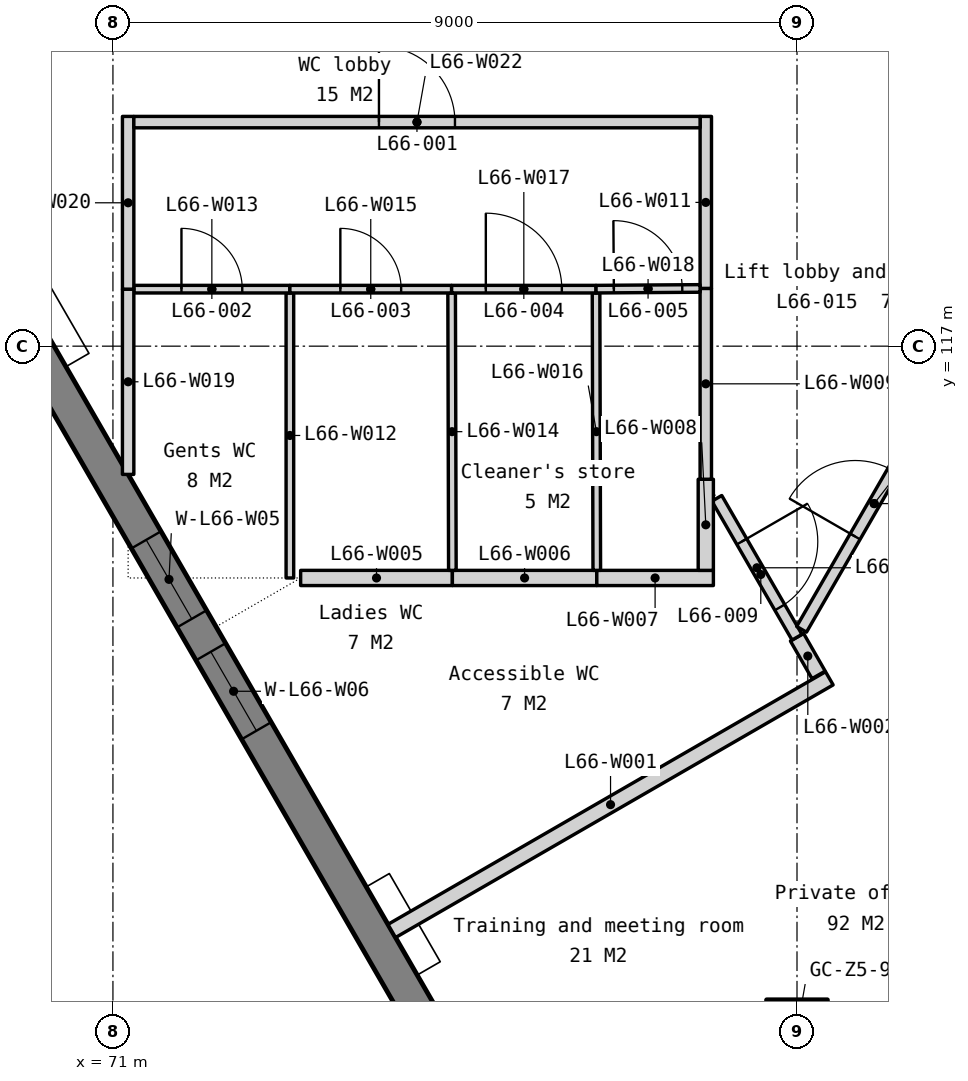
"""IFC4 building model, lengths in metres.
Left out: names, types, materials, properties, quantities, classifications, styles, units other than length and angle.
Written with IfcOpenShell. Run it as: python <this file> out.ifc"""

import sys

from ifc_helpers import new_model, si_unit, direction, frame, frame_2d, origin, origin_2d, place, context, subcontext, project, spatial, polyline, rectangle, outline, extrude, element, fill, save


model = new_model("IFC4")
c1 = context("Model", 3, precision=1e-05, world=origin(), true_north=direction((0.0, 1.0)))
c2 = subcontext(c1, "Body", "Model", "MODEL_VIEW")
j1 = project(units=[si_unit("LENGTHUNIT", "METRE"), si_unit("PLANEANGLEUNIT", "RADIAN")], contexts=[c1])
p1 = place(None, origin())
s1 = spatial("IfcSite", under=j1, at=p1, CompositionType="ELEMENT")
p2 = place(p1, origin())
s2 = spatial("IfcBuilding", under=s1, at=p2, CompositionType="ELEMENT")
p3 = place(p2, frame((0.0, 0.0, 269.9)))
s3 = spatial("IfcBuildingStorey", under=s2, at=p3, CompositionType="ELEMENT", Elevation=269.9)
p4 = place(p3, frame((80.0, 108.0, 0.0), z_axis=(0.0, 0.0, 1.0), x_axis=(1.0, 0.0, 0.0)))
e1 = element("IfcColumn", 1, at=p4, inside=s3, PredefinedType="COLUMN", context=c2, shape_type="SweptSolid", body=[
    extrude(rectangle(XDim=0.8, YDim=0.8, at=origin_2d()), origin(), (0.0, 0.0, 1.0), 3.9),
])
p5 = place(p3, frame((60.609, 133.207, -0.15), z_axis=(0.0, 0.0, 1.0), x_axis=(0.500002536638, -0.866023939251, 0.0)))
e2 = element("IfcWall", 2, at=p5, inside=s3, PredefinedType="SOLIDWALL", context=c2, shape_type="SweptSolid", body=[
    extrude(outline(polyline([(36.972, 0.0), (36.972, 3.9), (0.0, 3.9), (0.0, 0.0), (36.972, 0.0)])), frame((0.0, 0.225, 0.0), z_axis=(0.0, -1.0, 0.0), x_axis=(1.0, 0.0, 0.0)), (0.0, 0.0, 1.0), 0.45),
])
p6 = place(p5, frame((3.172, 0.0, 0.95)))
e3 = element("IfcOpeningElement", 3, at=p6, cuts=e2, PredefinedType="OPENING", context=c2, shape_type="SweptSolid", body=[
    extrude(rectangle(XDim=1.2, YDim=2.2, at=frame_2d((0.6, 1.1))), frame((0.0, 0.235, 0.0), z_axis=(0.0, -1.0, 0.0), x_axis=(1.0, 0.0, 0.0)), (0.0, 0.0, 1.0), 0.47),
])
p7 = place(p5, frame((4.872, 0.0, 0.95)))
e4 = element("IfcOpeningElement", 4, at=p7, cuts=e2, PredefinedType="OPENING", context=c2, shape_type="SweptSolid", body=[
    extrude(rectangle(XDim=1.2, YDim=2.2, at=frame_2d((0.6, 1.1))), frame((0.0, 0.235, 0.0), z_axis=(0.0, -1.0, 0.0), x_axis=(1.0, 0.0, 0.0)), (0.0, 0.0, 1.0), 0.47),
])
p8 = place(p5, frame((12.415, 0.0, 0.95)))
e5 = element("IfcOpeningElement", 5, at=p8, cuts=e2, PredefinedType="OPENING", context=c2, shape_type="SweptSolid", body=[
    extrude(rectangle(XDim=1.2, YDim=2.2, at=frame_2d((0.6, 1.1))), frame((0.0, 0.235, 0.0), z_axis=(0.0, -1.0, 0.0), x_axis=(1.0, 0.0, 0.0)), (0.0, 0.0, 1.0), 0.47),
])
p9 = place(p5, frame((14.115, 0.0, 0.95)))
e6 = element("IfcOpeningElement", 6, at=p9, cuts=e2, PredefinedType="OPENING", context=c2, shape_type="SweptSolid", body=[
    extrude(rectangle(XDim=1.2, YDim=2.2, at=frame_2d((0.6, 1.1))), frame((0.0, 0.235, 0.0), z_axis=(0.0, -1.0, 0.0), x_axis=(1.0, 0.0, 0.0)), (0.0, 0.0, 1.0), 0.47),
])
p10 = place(p5, frame((21.658, 0.0, 0.95)))
e7 = element("IfcOpeningElement", 7, at=p10, cuts=e2, PredefinedType="OPENING", context=c2, shape_type="SweptSolid", body=[
    extrude(rectangle(XDim=1.2, YDim=2.2, at=frame_2d((0.6, 1.1))), frame((0.0, 0.235, 0.0), z_axis=(0.0, -1.0, 0.0), x_axis=(1.0, 0.0, 0.0)), (0.0, 0.0, 1.0), 0.47),
])
p11 = place(p5, frame((23.358, 0.0, 0.95)))
e8 = element("IfcOpeningElement", 8, at=p11, cuts=e2, PredefinedType="OPENING", context=c2, shape_type="SweptSolid", body=[
    extrude(rectangle(XDim=1.2, YDim=2.2, at=frame_2d((0.6, 1.1))), frame((0.0, 0.235, 0.0), z_axis=(0.0, -1.0, 0.0), x_axis=(1.0, 0.0, 0.0)), (0.0, 0.0, 1.0), 0.47),
])
p12 = place(p5, frame((30.901, 0.0, 0.95)))
e9 = element("IfcOpeningElement", 9, at=p12, cuts=e2, PredefinedType="OPENING", context=c2, shape_type="SweptSolid", body=[
    extrude(rectangle(XDim=1.2, YDim=2.2, at=frame_2d((0.6, 1.1))), frame((0.0, 0.235, 0.0), z_axis=(0.0, -1.0, 0.0), x_axis=(1.0, 0.0, 0.0)), (0.0, 0.0, 1.0), 0.47),
])
p13 = place(p5, frame((32.601, 0.0, 0.95)))
e10 = element("IfcOpeningElement", 10, at=p13, cuts=e2, PredefinedType="OPENING", context=c2, shape_type="SweptSolid", body=[
    extrude(rectangle(XDim=1.2, YDim=2.2, at=frame_2d((0.6, 1.1))), frame((0.0, 0.235, 0.0), z_axis=(0.0, -1.0, 0.0), x_axis=(1.0, 0.0, 0.0)), (0.0, 0.0, 1.0), 0.47),
])
p14 = place(p3, frame((80.905, 101.188, -0.15), z_axis=(0.0, 0.0, 1.0), x_axis=(0.500002536638, 0.866023939251, 0.0)))
e11 = element("IfcWall", 11, at=p14, inside=s3, PredefinedType="SOLIDWALL", context=c2, shape_type="SweptSolid", body=[
    extrude(outline(polyline([(36.972, 0.0), (36.972, 3.9), (0.0, 3.9), (0.0, 0.0), (36.972, 0.0)])), frame((0.0, 0.225, 0.0), z_axis=(0.0, -1.0, 0.0), x_axis=(1.0, 0.0, 0.0)), (0.0, 0.0, 1.0), 0.45),
])
p15 = place(p14, frame((3.172, 0.0, 0.95)))
e12 = element("IfcOpeningElement", 12, at=p15, cuts=e11, PredefinedType="OPENING", context=c2, shape_type="SweptSolid", body=[
    extrude(rectangle(XDim=1.2, YDim=2.2, at=frame_2d((0.6, 1.1))), frame((0.0, 0.235, 0.0), z_axis=(0.0, -1.0, 0.0), x_axis=(1.0, 0.0, 0.0)), (0.0, 0.0, 1.0), 0.47),
])
p16 = place(p14, frame((4.872, 0.0, 0.95)))
e13 = element("IfcOpeningElement", 13, at=p16, cuts=e11, PredefinedType="OPENING", context=c2, shape_type="SweptSolid", body=[
    extrude(rectangle(XDim=1.2, YDim=2.2, at=frame_2d((0.6, 1.1))), frame((0.0, 0.235, 0.0), z_axis=(0.0, -1.0, 0.0), x_axis=(1.0, 0.0, 0.0)), (0.0, 0.0, 1.0), 0.47),
])
p17 = place(p14, frame((12.415, 0.0, 0.95)))
e14 = element("IfcOpeningElement", 14, at=p17, cuts=e11, PredefinedType="OPENING", context=c2, shape_type="SweptSolid", body=[
    extrude(rectangle(XDim=1.2, YDim=2.2, at=frame_2d((0.6, 1.1))), frame((0.0, 0.235, 0.0), z_axis=(0.0, -1.0, 0.0), x_axis=(1.0, 0.0, 0.0)), (0.0, 0.0, 1.0), 0.47),
])
p18 = place(p14, frame((14.115, 0.0, 0.95)))
e15 = element("IfcOpeningElement", 15, at=p18, cuts=e11, PredefinedType="OPENING", context=c2, shape_type="SweptSolid", body=[
    extrude(rectangle(XDim=1.2, YDim=2.2, at=frame_2d((0.6, 1.1))), frame((0.0, 0.235, 0.0), z_axis=(0.0, -1.0, 0.0), x_axis=(1.0, 0.0, 0.0)), (0.0, 0.0, 1.0), 0.47),
])
p19 = place(p14, frame((21.658, 0.0, 0.95)))
e16 = element("IfcOpeningElement", 16, at=p19, cuts=e11, PredefinedType="OPENING", context=c2, shape_type="SweptSolid", body=[
    extrude(rectangle(XDim=1.2, YDim=2.2, at=frame_2d((0.6, 1.1))), frame((0.0, 0.235, 0.0), z_axis=(0.0, -1.0, 0.0), x_axis=(1.0, 0.0, 0.0)), (0.0, 0.0, 1.0), 0.47),
])
p20 = place(p14, frame((23.358, 0.0, 0.95)))
e17 = element("IfcOpeningElement", 17, at=p20, cuts=e11, PredefinedType="OPENING", context=c2, shape_type="SweptSolid", body=[
    extrude(rectangle(XDim=1.2, YDim=2.2, at=frame_2d((0.6, 1.1))), frame((0.0, 0.235, 0.0), z_axis=(0.0, -1.0, 0.0), x_axis=(1.0, 0.0, 0.0)), (0.0, 0.0, 1.0), 0.47),
])
p21 = place(p14, frame((30.901, 0.0, 0.95)))
e18 = element("IfcOpeningElement", 18, at=p21, cuts=e11, PredefinedType="OPENING", context=c2, shape_type="SweptSolid", body=[
    extrude(rectangle(XDim=1.2, YDim=2.2, at=frame_2d((0.6, 1.1))), frame((0.0, 0.235, 0.0), z_axis=(0.0, -1.0, 0.0), x_axis=(1.0, 0.0, 0.0)), (0.0, 0.0, 1.0), 0.47),
])
p22 = place(p14, frame((32.601, 0.0, 0.95)))
e19 = element("IfcOpeningElement", 19, at=p22, cuts=e11, PredefinedType="OPENING", context=c2, shape_type="SweptSolid", body=[
    extrude(rectangle(XDim=1.2, YDim=2.2, at=frame_2d((0.6, 1.1))), frame((0.0, 0.235, 0.0), z_axis=(0.0, -1.0, 0.0), x_axis=(1.0, 0.0, 0.0)), (0.0, 0.0, 1.0), 0.47),
])
p23 = place(p3, frame((74.668, 109.306, 0.0), z_axis=(0.0, 0.0, 1.0), x_axis=(0.866026581292, 0.499997960491, 0.0)))
e20 = element("IfcWall", 20, at=p23, inside=s3, PredefinedType="PARTITIONING", context=c2, shape_type="SweptSolid", body=[
    extrude(rectangle(XDim=6.648, YDim=0.2, at=frame_2d((3.324, 0.0))), origin(), (0.0, 0.0, 1.0), 3.75),
])
p24 = place(p3, frame((80.0, 113.17, 0.0), z_axis=(0.0, 0.0, 1.0), x_axis=(0.497611459221, -0.867400043608, 0.0)))
e21 = element("IfcWall", 21, at=p24, inside=s3, PredefinedType="PARTITIONING", context=c2, shape_type="SweptSolid", body=[
    extrude(rectangle(XDim=0.571, YDim=0.2, at=frame_2d((0.286, 0.0))), origin(), (0.0, 0.0, 1.0), 3.75),
])
p25 = place(p3, frame((78.945, 114.998, 0.0), z_axis=(0.0, 0.0, 1.0), x_axis=(0.499959494327, -0.866048788483, 0.0)))
e22 = element("IfcWall", 22, at=p25, inside=s3, PredefinedType="PARTITIONING", context=c2, shape_type="SweptSolid", body=[
    extrude(rectangle(XDim=2.11, YDim=0.15, at=frame_2d((1.055, 0.0))), origin(), (0.0, 0.0, 1.0), 3.75),
])
p26 = place(p25, frame((0.657, 0.0, 0.0)))
e23 = element("IfcOpeningElement", 23, at=p26, cuts=e22, PredefinedType="OPENING", context=c2, shape_type="SweptSolid", body=[
    extrude(rectangle(XDim=1.0, YDim=2.1, at=frame_2d((0.5, 1.05))), frame((0.0, 0.085, 0.0), z_axis=(0.0, -1.0, 0.0), x_axis=(1.0, 0.0, 0.0)), (0.0, 0.0, 1.0), 0.17),
])
p27 = place(p3, frame((73.469, 113.95, 0.0), z_axis=(0.0, 0.0, 1.0), x_axis=(1.0, 0.0, 0.0)))
e24 = element("IfcWall", 24, at=p27, inside=s3, PredefinedType="PARTITIONING", context=c2, shape_type="SweptSolid", body=[
    extrude(rectangle(XDim=1.997, YDim=0.2, at=frame_2d((0.998, 0.0))), origin(), (0.0, 0.0, 1.0), 3.75),
])
p28 = place(p3, frame((75.466, 113.95, 0.0), z_axis=(0.0, 0.0, 1.0), x_axis=(1.0, 0.0, 0.0)))
e25 = element("IfcWall", 25, at=p28, inside=s3, PredefinedType="PARTITIONING", context=c2, shape_type="SweptSolid", body=[
    extrude(rectangle(XDim=1.9, YDim=0.2, at=frame_2d((0.95, 0.0))), origin(), (0.0, 0.0, 1.0), 3.75),
])
p29 = place(p3, frame((77.366, 113.95, 0.0), z_axis=(0.0, 0.0, 1.0), x_axis=(1.0, 0.0, 0.0)))
e26 = element("IfcWall", 26, at=p29, inside=s3, PredefinedType="PARTITIONING", context=c2, shape_type="SweptSolid", body=[
    extrude(rectangle(XDim=1.534, YDim=0.2, at=frame_2d((0.767, 0.0))), origin(), (0.0, 0.0, 1.0), 3.75),
])
p30 = place(p3, frame((78.8, 114.05, 0.0), z_axis=(0.0, 0.0, 1.0), x_axis=(0.0, 1.0, 0.0)))
e27 = element("IfcWall", 27, at=p30, inside=s3, PredefinedType="PARTITIONING", context=c2, shape_type="SweptSolid", body=[
    extrude(rectangle(XDim=1.199, YDim=0.2, at=frame_2d((0.6, 0.0))), origin(), (0.0, 0.0, 1.0), 3.75),
])
p31 = place(p3, frame((78.8, 115.249, 0.0), z_axis=(0.0, 0.0, 1.0), x_axis=(0.0, 1.0, 0.0)))
e28 = element("IfcWall", 28, at=p31, inside=s3, PredefinedType="PARTITIONING", context=c2, shape_type="SweptSolid", body=[
    extrude(rectangle(XDim=2.511, YDim=0.15, at=frame_2d((1.255, 0.0))), origin(), (0.0, 0.0, 1.0), 3.75),
])
p32 = place(p3, frame((80.06, 113.274, 0.0), z_axis=(0.0, 0.0, 1.0), x_axis=(0.499987977232, 0.866032345022, 0.0)))
e29 = element("IfcWall", 29, at=p32, inside=s3, PredefinedType="PARTITIONING", context=c2, shape_type="SweptSolid", body=[
    extrude(rectangle(XDim=3.82, YDim=0.15, at=frame_2d((1.91, 0.0))), origin(), (0.0, 0.0, 1.0), 3.75),
])
p33 = place(p32, frame((1.41, 0.0, 0.0)))
e30 = element("IfcOpeningElement", 30, at=p33, cuts=e29, PredefinedType="OPENING", context=c2, shape_type="SweptSolid", body=[
    extrude(rectangle(XDim=1.0, YDim=2.1, at=frame_2d((0.5, 1.05))), frame((0.0, 0.085, 0.0), z_axis=(0.0, -1.0, 0.0), x_axis=(1.0, 0.0, 0.0)), (0.0, 0.0, 1.0), 0.17),
])
p34 = place(p3, frame((78.8, 117.76, 0.0), z_axis=(0.0, 0.0, 1.0), x_axis=(0.0, 1.0, 0.0)))
e31 = element("IfcWall", 31, at=p34, inside=s3, PredefinedType="PARTITIONING", context=c2, shape_type="SweptSolid", body=[
    extrude(rectangle(XDim=2.263, YDim=0.15, at=frame_2d((1.131, 0.0))), origin(), (0.0, 0.0, 1.0), 3.75),
])
p35 = place(p3, frame((73.328, 113.95, 0.0), z_axis=(0.0, 0.0, 1.0), x_axis=(0.0, 1.0, 0.0)))
e32 = element("IfcWall", 32, at=p35, inside=s3, PredefinedType="PARTITIONING", context=c2, shape_type="SweptSolid", body=[
    extrude(rectangle(XDim=3.75, YDim=0.1, at=frame_2d((1.875, 0.0))), origin(), (0.0, 0.0, 1.0), 3.75),
])
p36 = place(p3, frame((71.275, 117.75, 0.0), z_axis=(0.0, 0.0, 1.0), x_axis=(1.0, 0.0, 0.0)))
e33 = element("IfcWall", 33, at=p36, inside=s3, PredefinedType="PARTITIONING", context=c2, shape_type="SweptSolid", body=[
    extrude(rectangle(XDim=2.053, YDim=0.1, at=frame_2d((1.026, 0.0))), origin(), (0.0, 0.0, 1.0), 3.75),
])
p37 = place(p36, frame((0.626, 0.0, 0.0)))
e34 = element("IfcOpeningElement", 34, at=p37, cuts=e33, PredefinedType="OPENING", context=c2, shape_type="SweptSolid", body=[
    extrude(rectangle(XDim=0.8, YDim=2.1, at=frame_2d((0.4, 1.05))), frame((0.0, 0.06, 0.0), z_axis=(0.0, -1.0, 0.0), x_axis=(1.0, 0.0, 0.0)), (0.0, 0.0, 1.0), 0.12),
])
p38 = place(p3, frame((75.466, 114.05, 0.0), z_axis=(0.0, 0.0, 1.0), x_axis=(-0.002675575707, 0.999996420641, 0.0)))
e35 = element("IfcWall", 35, at=p38, inside=s3, PredefinedType="PARTITIONING", context=c2, shape_type="SweptSolid", body=[
    extrude(rectangle(XDim=3.65, YDim=0.1, at=frame_2d((1.825, 0.0))), origin(), (0.0, 0.0, 1.0), 3.75),
])
p39 = place(p3, frame((73.328, 117.75, 0.0), z_axis=(0.0, 0.0, 1.0), x_axis=(1.0, 0.0, 0.0)))
e36 = element("IfcWall", 36, at=p39, inside=s3, PredefinedType="PARTITIONING", context=c2, shape_type="SweptSolid", body=[
    extrude(rectangle(XDim=2.128, YDim=0.1, at=frame_2d((1.064, 0.0))), origin(), (0.0, 0.0, 1.0), 3.75),
])
p40 = place(p39, frame((0.664, 0.0, 0.0)))
e37 = element("IfcOpeningElement", 37, at=p40, cuts=e36, PredefinedType="OPENING", context=c2, shape_type="SweptSolid", body=[
    extrude(rectangle(XDim=0.8, YDim=2.1, at=frame_2d((0.4, 1.05))), frame((0.0, 0.06, 0.0), z_axis=(0.0, -1.0, 0.0), x_axis=(1.0, 0.0, 0.0)), (0.0, 0.0, 1.0), 0.12),
])
p41 = place(p3, frame((77.366, 114.05, 0.0), z_axis=(0.0, 0.0, 1.0), x_axis=(-0.002608686776, 0.999996597371, 0.0)))
e38 = element("IfcWall", 38, at=p41, inside=s3, PredefinedType="PARTITIONING", context=c2, shape_type="SweptSolid", body=[
    extrude(rectangle(XDim=3.65, YDim=0.1, at=frame_2d((1.825, 0.0))), origin(), (0.0, 0.0, 1.0), 3.75),
])
p42 = place(p3, frame((75.456, 117.75, 0.0), z_axis=(0.0, 0.0, 1.0), x_axis=(1.0, 0.0, 0.0)))
e39 = element("IfcWall", 39, at=p42, inside=s3, PredefinedType="PARTITIONING", context=c2, shape_type="SweptSolid", body=[
    extrude(rectangle(XDim=1.9, YDim=0.1, at=frame_2d((0.95, 0.0))), origin(), (0.0, 0.0, 1.0), 3.75),
])
p43 = place(p42, frame((0.45, 0.0, 0.0)))
e40 = element("IfcOpeningElement", 40, at=p43, cuts=e39, PredefinedType="OPENING", context=c2, shape_type="SweptSolid", body=[
    extrude(rectangle(XDim=1.0, YDim=2.1, at=frame_2d((0.5, 1.05))), frame((0.0, 0.06, 0.0), z_axis=(0.0, -1.0, 0.0), x_axis=(1.0, 0.0, 0.0)), (0.0, 0.0, 1.0), 0.12),
])
p44 = place(p3, frame((77.356, 117.75, 0.0), z_axis=(0.0, 0.0, 1.0), x_axis=(0.999975819379, 0.006954182767, 0.0)))
e41 = element("IfcWall", 41, at=p44, inside=s3, PredefinedType="PARTITIONING", context=c2, shape_type="SweptSolid", body=[
    extrude(rectangle(XDim=1.369, YDim=0.1, at=frame_2d((0.685, 0.0))), origin(), (0.0, 0.0, 1.0), 3.75),
])
p45 = place(p44, frame((0.235, 0.0, 0.0)))
e42 = element("IfcOpeningElement", 42, at=p45, cuts=e41, PredefinedType="OPENING", context=c2, shape_type="SweptSolid", body=[
    extrude(rectangle(XDim=0.9, YDim=2.1, at=frame_2d((0.45, 1.05))), frame((0.0, 0.06, 0.0), z_axis=(0.0, -1.0, 0.0), x_axis=(1.0, 0.0, 0.0)), (0.0, 0.0, 1.0), 0.12),
])
p46 = place(p3, frame((71.2, 115.313, 0.0), z_axis=(0.0, 0.0, 1.0), x_axis=(0.0, 1.0, 0.0)))
e43 = element("IfcWall", 43, at=p46, inside=s3, PredefinedType="PARTITIONING", context=c2, shape_type="SweptSolid", body=[
    extrude(rectangle(XDim=2.437, YDim=0.15, at=frame_2d((1.219, 0.0))), origin(), (0.0, 0.0, 1.0), 3.062),
])
p47 = place(p3, frame((71.2, 117.75, 0.0), z_axis=(0.0, 0.0, 1.0), x_axis=(0.0, 1.0, 0.0)))
e44 = element("IfcWall", 44, at=p47, inside=s3, PredefinedType="PARTITIONING", context=c2, shape_type="SweptSolid", body=[
    extrude(rectangle(XDim=2.273, YDim=0.15, at=frame_2d((1.136, 0.0))), origin(), (0.0, 0.0, 1.0), 3.062),
])
p48 = place(p3, frame((71.275, 119.948, 0.0), z_axis=(0.0, 0.0, 1.0), x_axis=(1.0, 0.0, 0.0)))
e45 = element("IfcWall", 45, at=p48, inside=s3, PredefinedType="PARTITIONING", context=c2, shape_type="SweptSolid", body=[
    extrude(rectangle(XDim=7.45, YDim=0.15, at=frame_2d((3.725, 0.0))), origin(), (0.0, 0.0, 1.0), 3.75),
])
p49 = place(p48, frame((3.225, 0.0, 0.0)))
e46 = element("IfcOpeningElement", 46, at=p49, cuts=e45, PredefinedType="OPENING", context=c2, shape_type="SweptSolid", body=[
    extrude(rectangle(XDim=1.0, YDim=2.1, at=frame_2d((0.5, 1.05))), frame((0.0, 0.085, 0.0), z_axis=(0.0, -1.0, 0.0), x_axis=(1.0, 0.0, 0.0)), (0.0, 0.0, 1.0), 0.17),
])
p50 = place(p10, origin())
e47 = element("IfcWindow", 47, at=p50, inside=s3, PartitioningType="SINGLE_PANEL", PredefinedType="WINDOW", context=c2, shape_type="SweptSolid", body=[
    extrude(rectangle(XDim=1.2, YDim=2.2, at=frame_2d((0.6, 1.1))), frame((0.0, 0.03, 0.0), z_axis=(0.0, -1.0, 0.0), x_axis=(1.0, 0.0, 0.0)), (0.0, 0.0, 1.0), 0.06),
])
fill(e7, e47)
p51 = place(p11, origin())
e48 = element("IfcWindow", 48, at=p51, inside=s3, PartitioningType="SINGLE_PANEL", PredefinedType="WINDOW", context=c2, shape_type="SweptSolid", body=[
    extrude(rectangle(XDim=1.2, YDim=2.2, at=frame_2d((0.6, 1.1))), frame((0.0, 0.03, 0.0), z_axis=(0.0, -1.0, 0.0), x_axis=(1.0, 0.0, 0.0)), (0.0, 0.0, 1.0), 0.06),
])
fill(e8, e48)
p52 = place(p49, origin())
e49 = element("IfcDoor", 49, at=p52, inside=s3, OperationType="SINGLE_SWING_LEFT", PredefinedType="DOOR", context=c2, shape_type="SweptSolid", body=[
    extrude(rectangle(XDim=1.0, YDim=2.1, at=frame_2d((0.5, 1.05))), frame((0.0, 0.025, 0.0), z_axis=(0.0, -1.0, 0.0), x_axis=(1.0, 0.0, 0.0)), (0.0, 0.0, 1.0), 0.05),
])
fill(e46, e49)
p53 = place(p37, origin())
e50 = element("IfcDoor", 50, at=p53, inside=s3, OperationType="SINGLE_SWING_LEFT", PredefinedType="DOOR", context=c2, shape_type="SweptSolid", body=[
    extrude(rectangle(XDim=0.8, YDim=2.1, at=frame_2d((0.4, 1.05))), frame((0.0, 0.025, 0.0), z_axis=(0.0, -1.0, 0.0), x_axis=(1.0, 0.0, 0.0)), (0.0, 0.0, 1.0), 0.05),
])
fill(e34, e50)
p54 = place(p40, origin())
e51 = element("IfcDoor", 51, at=p54, inside=s3, OperationType="SINGLE_SWING_LEFT", PredefinedType="DOOR", context=c2, shape_type="SweptSolid", body=[
    extrude(rectangle(XDim=0.8, YDim=2.1, at=frame_2d((0.4, 1.05))), frame((0.0, 0.025, 0.0), z_axis=(0.0, -1.0, 0.0), x_axis=(1.0, 0.0, 0.0)), (0.0, 0.0, 1.0), 0.05),
])
fill(e37, e51)
p55 = place(p43, origin())
e52 = element("IfcDoor", 52, at=p55, inside=s3, OperationType="SINGLE_SWING_LEFT", PredefinedType="DOOR", context=c2, shape_type="SweptSolid", body=[
    extrude(rectangle(XDim=1.0, YDim=2.1, at=frame_2d((0.5, 1.05))), frame((0.0, 0.025, 0.0), z_axis=(0.0, -1.0, 0.0), x_axis=(1.0, 0.0, 0.0)), (0.0, 0.0, 1.0), 0.05),
])
fill(e40, e52)
p56 = place(p45, origin())
e53 = element("IfcDoor", 53, at=p56, inside=s3, OperationType="SINGLE_SWING_LEFT", PredefinedType="DOOR", context=c2, shape_type="SweptSolid", body=[
    extrude(rectangle(XDim=0.9, YDim=2.1, at=frame_2d((0.45, 1.05))), frame((0.0, 0.025, 0.0), z_axis=(0.0, -1.0, 0.0), x_axis=(1.0, 0.0, 0.0)), (0.0, 0.0, 1.0), 0.05),
])
fill(e42, e53)
p57 = place(p26, origin())
e54 = element("IfcDoor", 54, at=p57, inside=s3, OperationType="SINGLE_SWING_LEFT", PredefinedType="DOOR", context=c2, shape_type="SweptSolid", body=[
    extrude(rectangle(XDim=1.0, YDim=2.1, at=frame_2d((0.5, 1.05))), frame((0.0, 0.025, 0.0), z_axis=(0.0, -1.0, 0.0), x_axis=(1.0, 0.0, 0.0)), (0.0, 0.0, 1.0), 0.05),
])
fill(e23, e54)
p58 = place(p33, origin())
e55 = element("IfcDoor", 55, at=p58, inside=s3, OperationType="SINGLE_SWING_LEFT", PredefinedType="DOOR", context=c2, shape_type="SweptSolid", body=[
    extrude(rectangle(XDim=1.0, YDim=2.1, at=frame_2d((0.5, 1.05))), frame((0.0, 0.025, 0.0), z_axis=(0.0, -1.0, 0.0), x_axis=(1.0, 0.0, 0.0)), (0.0, 0.0, 1.0), 0.05),
])
fill(e30, e55)
save(model, sys.argv[1])
